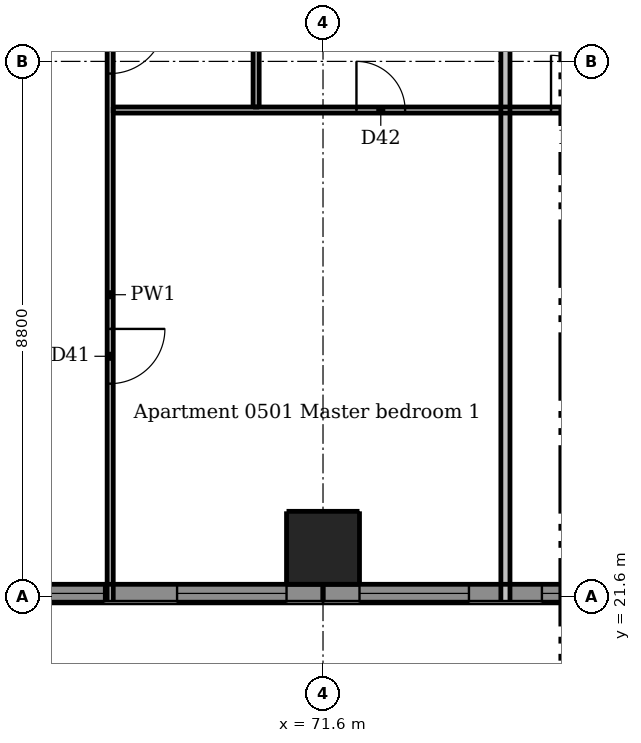
"""IFC4 building model, lengths in metres.
Left out: names, types, materials, properties, quantities, classifications, styles, units other than length and angle.
Written with IfcOpenShell. Run it as: python <this file> out.ifc"""

import sys

from ifc_helpers import new_model, si_unit, direction, frame, frame_2d, origin, origin_2d, place, context, subcontext, project, spatial, rectangle, extrude, element, fill, save


model = new_model("IFC4")
c1 = context("Model", 3, precision=1e-05, world=origin(), true_north=direction((0.0, 1.0)))
c2 = subcontext(c1, "Body", "Model", "MODEL_VIEW")
j1 = project(units=[si_unit("LENGTHUNIT", "METRE"), si_unit("PLANEANGLEUNIT", "RADIAN")], contexts=[c1])
p1 = place(None, origin())
s1 = spatial("IfcSite", under=j1, at=p1, CompositionType="ELEMENT")
p2 = place(p1, origin())
s2 = spatial("IfcBuilding", under=s1, at=p2, CompositionType="ELEMENT")
p3 = place(p2, frame((0.0, 0.0, 23.5)))
s3 = spatial("IfcBuildingStorey", under=s2, at=p3, CompositionType="ELEMENT", Elevation=23.5)
p4 = place(p3, frame((71.6, 22.4, 0.0), z_axis=(0.0, 0.0, 1.0), x_axis=(1.0, 0.0, 0.0)))
e1 = element("IfcColumn", 1, at=p4, inside=s3, PredefinedType="COLUMN", context=c2, shape_type="SweptSolid", body=[
    extrude(rectangle(XDim=1.2, YDim=1.2, at=origin_2d()), origin(), (0.0, 0.0, 1.0), 3.05),
])
p5 = place(p3, frame((65.6, 21.65, 0.0), z_axis=(0.0, 0.0, 1.0), x_axis=(1.0, 0.0, 0.0)))
e2 = element("IfcWall", 2, at=p5, inside=s3, PredefinedType="SOLIDWALL", context=c2, shape_type="SweptSolid", body=[
    extrude(rectangle(XDim=6.0, YDim=0.3, at=frame_2d((3.0, 0.0))), origin(), (0.0, 0.0, 1.0), 3.05),
])
p6 = place(p5, frame((0.6, 0.0, 0.15)))
e3 = element("IfcOpeningElement", 3, at=p6, cuts=e2, PredefinedType="OPENING", context=c2, shape_type="SweptSolid", body=[
    extrude(rectangle(XDim=1.8, YDim=2.1, at=frame_2d((0.9, 1.05))), frame((0.0, 0.16, 0.0), z_axis=(0.0, -1.0, 0.0), x_axis=(1.0, 0.0, 0.0)), (0.0, 0.0, 1.0), 0.32),
])
p7 = place(p5, frame((3.6, 0.0, 0.15)))
e4 = element("IfcOpeningElement", 4, at=p7, cuts=e2, PredefinedType="OPENING", context=c2, shape_type="SweptSolid", body=[
    extrude(rectangle(XDim=1.8, YDim=2.1, at=frame_2d((0.9, 1.05))), frame((0.0, 0.16, 0.0), z_axis=(0.0, -1.0, 0.0), x_axis=(1.0, 0.0, 0.0)), (0.0, 0.0, 1.0), 0.32),
])
p8 = place(p3, frame((71.6, 21.65, 0.0), z_axis=(0.0, 0.0, 1.0), x_axis=(1.0, 0.0, 0.0)))
e5 = element("IfcWall", 5, at=p8, inside=s3, PredefinedType="SOLIDWALL", context=c2, shape_type="SweptSolid", body=[
    extrude(rectangle(XDim=5.7, YDim=0.3, at=frame_2d((2.85, 0.0))), origin(), (0.0, 0.0, 1.0), 3.05),
])
p9 = place(p8, frame((0.6, 0.0, 0.15)))
e6 = element("IfcOpeningElement", 6, at=p9, cuts=e5, PredefinedType="OPENING", context=c2, shape_type="SweptSolid", body=[
    extrude(rectangle(XDim=1.8, YDim=2.1, at=frame_2d((0.9, 1.05))), frame((0.0, 0.16, 0.0), z_axis=(0.0, -1.0, 0.0), x_axis=(1.0, 0.0, 0.0)), (0.0, 0.0, 1.0), 0.32),
])
p10 = place(p8, frame((3.6, 0.0, 0.15)))
e7 = element("IfcOpeningElement", 7, at=p10, cuts=e5, PredefinedType="OPENING", context=c2, shape_type="SweptSolid", body=[
    extrude(rectangle(XDim=1.8, YDim=2.1, at=frame_2d((0.9, 1.05))), frame((0.0, 0.16, 0.0), z_axis=(0.0, -1.0, 0.0), x_axis=(1.0, 0.0, 0.0)), (0.0, 0.0, 1.0), 0.32),
])
p11 = place(p3, frame((68.1, 31.625, 0.0), z_axis=(0.0, 0.0, 1.0), x_axis=(0.0, -1.0, 0.0)))
e8 = element("IfcWall", 8, at=p11, inside=s3, PredefinedType="PARTITIONING", context=c2, shape_type="SweptSolid", body=[
    extrude(rectangle(XDim=10.125, YDim=0.1, at=frame_2d((5.062, 0.0))), origin(), (0.0, 0.0, 1.0), 3.05),
])
p12 = place(p11, frame((0.525, 0.0, 0.0)))
e9 = element("IfcOpeningElement", 9, at=p12, cuts=e8, PredefinedType="OPENING", context=c2, shape_type="SweptSolid", body=[
    extrude(rectangle(XDim=0.9, YDim=2.1, at=frame_2d((0.45, 1.05))), frame((0.0, 0.06, 0.0), z_axis=(0.0, -1.0, 0.0), x_axis=(1.0, 0.0, 0.0)), (0.0, 0.0, 1.0), 0.12),
])
p13 = place(p11, frame((5.625, 0.0, 0.0)))
e10 = element("IfcOpeningElement", 10, at=p13, cuts=e8, PredefinedType="OPENING", context=c2, shape_type="SweptSolid", body=[
    extrude(rectangle(XDim=0.9, YDim=2.1, at=frame_2d((0.45, 1.05))), frame((0.0, 0.06, 0.0), z_axis=(0.0, -1.0, 0.0), x_axis=(1.0, 0.0, 0.0)), (0.0, 0.0, 1.0), 0.12),
])
p14 = place(p3, frame((70.5, 29.65, 0.0), z_axis=(0.0, 0.0, 1.0), x_axis=(0.0, 1.0, 0.0)))
e11 = element("IfcWall", 11, at=p14, inside=s3, PredefinedType="PARTITIONING", context=c2, shape_type="SweptSolid", body=[
    extrude(rectangle(XDim=1.975, YDim=0.1, at=frame_2d((0.988, 0.0))), origin(), (0.0, 0.0, 1.0), 3.05),
])
p15 = place(p3, frame((68.15, 29.6, 0.0), z_axis=(0.0, 0.0, 1.0), x_axis=(1.0, 0.0, 0.0)))
e12 = element("IfcWall", 12, at=p15, inside=s3, PredefinedType="PARTITIONING", context=c2, shape_type="SweptSolid", body=[
    extrude(rectangle(XDim=8.8, YDim=0.1, at=frame_2d((4.4, 0.0))), origin(), (0.0, 0.0, 1.0), 3.05),
])
p16 = place(p15, frame((4.0, 0.0, 0.0)))
e13 = element("IfcOpeningElement", 13, at=p16, cuts=e12, PredefinedType="OPENING", context=c2, shape_type="SweptSolid", body=[
    extrude(rectangle(XDim=0.8, YDim=2.1, at=frame_2d((0.4, 1.05))), frame((0.0, 0.06, 0.0), z_axis=(0.0, -1.0, 0.0), x_axis=(1.0, 0.0, 0.0)), (0.0, 0.0, 1.0), 0.12),
])
p17 = place(p15, frame((7.2, 0.0, 0.0)))
e14 = element("IfcOpeningElement", 14, at=p17, cuts=e12, PredefinedType="OPENING", context=c2, shape_type="SweptSolid", body=[
    extrude(rectangle(XDim=0.9, YDim=2.1, at=frame_2d((0.45, 1.05))), frame((0.0, 0.06, 0.0), z_axis=(0.0, -1.0, 0.0), x_axis=(1.0, 0.0, 0.0)), (0.0, 0.0, 1.0), 0.12),
])
p18 = place(p3, frame((74.6, 21.5, 0.0), z_axis=(0.0, 0.0, 1.0), x_axis=(0.0, 1.0, 0.0)))
e15 = element("IfcWall", 15, at=p18, inside=s3, PredefinedType="PARTITIONING", context=c2, shape_type="SweptSolid", body=[
    extrude(rectangle(XDim=10.125, YDim=0.15, at=frame_2d((5.062, 0.0))), origin(), (0.0, 0.0, 1.0), 3.05),
])
p19 = place(p6, origin())
e16 = element("IfcWindow", 16, at=p19, inside=s3, PartitioningType="DOUBLE_PANEL_VERTICAL", PredefinedType="WINDOW", context=c2, shape_type="SweptSolid", body=[
    extrude(rectangle(XDim=1.8, YDim=2.1, at=frame_2d((0.9, 1.05))), frame((0.0, 0.03, 0.0), z_axis=(0.0, -1.0, 0.0), x_axis=(1.0, 0.0, 0.0)), (0.0, 0.0, 1.0), 0.06),
])
fill(e3, e16)
p20 = place(p7, origin())
e17 = element("IfcWindow", 17, at=p20, inside=s3, PartitioningType="DOUBLE_PANEL_VERTICAL", PredefinedType="WINDOW", context=c2, shape_type="SweptSolid", body=[
    extrude(rectangle(XDim=1.8, YDim=2.1, at=frame_2d((0.9, 1.05))), frame((0.0, 0.03, 0.0), z_axis=(0.0, -1.0, 0.0), x_axis=(1.0, 0.0, 0.0)), (0.0, 0.0, 1.0), 0.06),
])
fill(e4, e17)
p21 = place(p9, origin())
e18 = element("IfcWindow", 18, at=p21, inside=s3, PartitioningType="DOUBLE_PANEL_VERTICAL", PredefinedType="WINDOW", context=c2, shape_type="SweptSolid", body=[
    extrude(rectangle(XDim=1.8, YDim=2.1, at=frame_2d((0.9, 1.05))), frame((0.0, 0.03, 0.0), z_axis=(0.0, -1.0, 0.0), x_axis=(1.0, 0.0, 0.0)), (0.0, 0.0, 1.0), 0.06),
])
fill(e6, e18)
p22 = place(p10, origin())
e19 = element("IfcWindow", 19, at=p22, inside=s3, PartitioningType="DOUBLE_PANEL_VERTICAL", PredefinedType="WINDOW", context=c2, shape_type="SweptSolid", body=[
    extrude(rectangle(XDim=1.8, YDim=2.1, at=frame_2d((0.9, 1.05))), frame((0.0, 0.03, 0.0), z_axis=(0.0, -1.0, 0.0), x_axis=(1.0, 0.0, 0.0)), (0.0, 0.0, 1.0), 0.06),
])
fill(e7, e19)
p23 = place(p12, origin())
e20 = element("IfcDoor", 20, at=p23, inside=s3, OperationType="SINGLE_SWING_LEFT", PredefinedType="DOOR", context=c2, shape_type="SweptSolid", body=[
    extrude(rectangle(XDim=0.9, YDim=2.1, at=frame_2d((0.45, 1.05))), frame((0.0, 0.025, 0.0), z_axis=(0.0, -1.0, 0.0), x_axis=(1.0, 0.0, 0.0)), (0.0, 0.0, 1.0), 0.05),
])
fill(e9, e20)
p24 = place(p13, origin())
e21 = element("IfcDoor", 21, at=p24, inside=s3, OperationType="SINGLE_SWING_LEFT", PredefinedType="DOOR", context=c2, shape_type="SweptSolid", body=[
    extrude(rectangle(XDim=0.9, YDim=2.1, at=frame_2d((0.45, 1.05))), frame((0.0, 0.025, 0.0), z_axis=(0.0, -1.0, 0.0), x_axis=(1.0, 0.0, 0.0)), (0.0, 0.0, 1.0), 0.05),
])
fill(e10, e21)
p25 = place(p16, origin())
e22 = element("IfcDoor", 22, at=p25, inside=s3, OperationType="SINGLE_SWING_LEFT", PredefinedType="DOOR", context=c2, shape_type="SweptSolid", body=[
    extrude(rectangle(XDim=0.8, YDim=2.1, at=frame_2d((0.4, 1.05))), frame((0.0, 0.025, 0.0), z_axis=(0.0, -1.0, 0.0), x_axis=(1.0, 0.0, 0.0)), (0.0, 0.0, 1.0), 0.05),
])
fill(e13, e22)
p26 = place(p17, origin())
e23 = element("IfcDoor", 23, at=p26, inside=s3, OperationType="SINGLE_SWING_LEFT", PredefinedType="DOOR", context=c2, shape_type="SweptSolid", body=[
    extrude(rectangle(XDim=0.9, YDim=2.1, at=frame_2d((0.45, 1.05))), frame((0.0, 0.025, 0.0), z_axis=(0.0, -1.0, 0.0), x_axis=(1.0, 0.0, 0.0)), (0.0, 0.0, 1.0), 0.05),
])
fill(e14, e23)
save(model, sys.argv[1])
